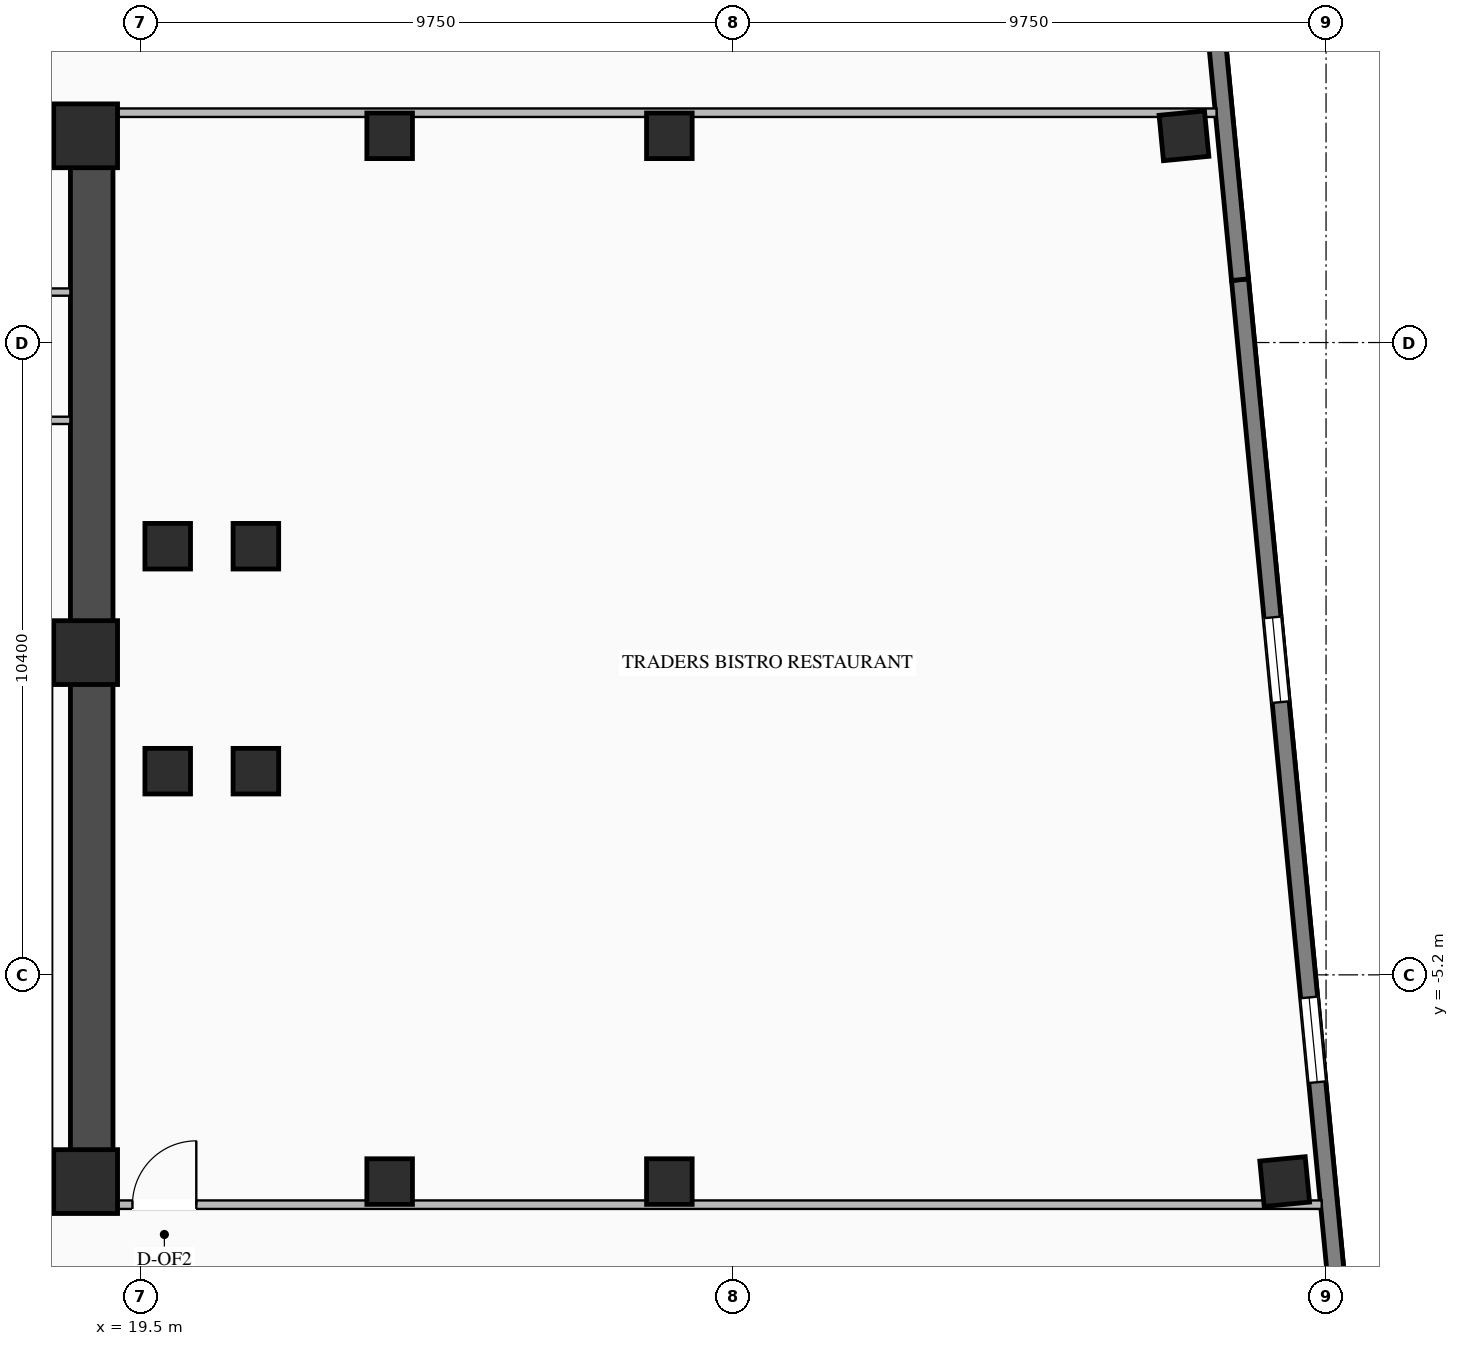
"""IFC4 building model, lengths in metres.
Left out: names, types, materials, properties, quantities, classifications, styles, units other than length and angle.
Written with IfcOpenShell. Run it as: python <this file> out.ifc"""

import sys

from ifc_helpers import new_model, si_unit, direction, frame, frame_2d, origin, origin_2d, place, context, subcontext, project, spatial, rectangle, i_section, extrude, element, fill, save


model = new_model("IFC4")
c1 = context("Model", 3, precision=1e-05, world=origin(), true_north=direction((0.0, 1.0)))
c2 = subcontext(c1, "Body", "Model", "MODEL_VIEW")
j1 = project(units=[si_unit("LENGTHUNIT", "METRE"), si_unit("PLANEANGLEUNIT", "RADIAN")], contexts=[c1])
p1 = place(None, origin())
s1 = spatial("IfcSite", under=j1, at=p1, CompositionType="ELEMENT")
p2 = place(p1, origin())
s2 = spatial("IfcBuilding", under=s1, at=p2, CompositionType="ELEMENT")
p3 = place(p2, frame((0.0, 0.0, 108.7)))
s3 = spatial("IfcBuildingStorey", under=s2, at=p3, CompositionType="ELEMENT", Elevation=108.7)
p4 = place(p3, frame((8.8, -8.7, 0.0), z_axis=(0.0, 0.0, 1.0), x_axis=(1.0, 0.0, 0.0)))
e1 = element("IfcWall", 1, at=p4, inside=s3, PredefinedType="SHEAR", context=c2, shape_type="SweptSolid", body=[
    extrude(rectangle(XDim=10.25, YDim=0.7, at=frame_2d((5.125, 0.0))), origin(), (0.0, 0.0, 1.0), 3.17),
])
p5 = place(p3, frame((8.8, 8.7, 0.0), z_axis=(0.0, 0.0, 1.0), x_axis=(1.0, 0.0, 0.0)))
e2 = element("IfcWall", 2, at=p5, inside=s3, PredefinedType="SHEAR", context=c2, shape_type="SweptSolid", body=[
    extrude(rectangle(XDim=10.25, YDim=0.7, at=frame_2d((5.125, 0.0))), origin(), (0.0, 0.0, 1.0), 3.17),
])
p6 = place(p5, frame((3.25, 0.0, 0.0)))
e3 = element("IfcOpeningElement", 3, at=p6, cuts=e2, PredefinedType="OPENING", context=c2, shape_type="SweptSolid", body=[
    extrude(rectangle(XDim=1.4, YDim=2.05, at=frame_2d((0.7, 1.025))), frame((0.0, 0.36, 0.0), z_axis=(0.0, -1.0, 0.0), x_axis=(1.0, 0.0, 0.0)), (0.0, 0.0, 1.0), 0.72),
])
p7 = place(p3, frame((18.7, -8.35, 0.0), z_axis=(0.0, 0.0, 1.0), x_axis=(0.0, 1.0, 0.0)))
e4 = element("IfcWall", 4, at=p7, inside=s3, PredefinedType="SHEAR", context=c2, shape_type="SweptSolid", body=[
    extrude(rectangle(XDim=16.7, YDim=0.7, at=frame_2d((8.35, 0.0))), origin(), (0.0, 0.0, 1.0), 3.17),
])
for number, where, z_axis, x_axis in (
    (5, (18.6, -8.6, 0.0), (0.0, 0.0, 1.0), (1.0, 0.0, 0.0)),
    (6, (18.6, 0.1, 0.0), (0.0, 0.0, 1.0), (1.0, 0.0, 0.0)),
    (7, (18.6, 8.6, 0.0), (0.0, 0.0, 1.0), (1.0, 0.0, 0.0)),
):
    element("IfcColumn", number, at=place(p3, frame(where, z_axis=z_axis, x_axis=x_axis)), inside=s3, PredefinedType="COLUMN", context=c2, shape_type="SweptSolid", body=[
        extrude(rectangle(XDim=1.05, YDim=1.05, at=origin_2d()), origin(), (0.0, 0.0, 1.0), 3.45),
    ])
for number, where, z_axis, x_axis in (
    (8, (19.95, -1.85, 0.0), (0.0, 0.0, 1.0), (1.0, 0.0, 0.0)),
    (9, (19.95, 1.85, 0.0), (0.0, 0.0, 1.0), (1.0, 0.0, 0.0)),
    (10, (21.4, -1.85, 0.0), (0.0, 0.0, 1.0), (1.0, 0.0, 0.0)),
    (11, (21.4, 1.85, 0.0), (0.0, 0.0, 1.0), (1.0, 0.0, 0.0)),
    (12, (23.6, -8.6, 0.0), (0.0, 0.0, 1.0), (1.0, 0.0, 0.0)),
    (13, (23.6, 8.6, 0.0), (0.0, 0.0, 1.0), (1.0, 0.0, 0.0)),
    (14, (28.2, -8.6, 0.0), (0.0, 0.0, 1.0), (1.0, 0.0, 0.0)),
    (15, (28.2, 8.6, 0.0), (0.0, 0.0, 1.0), (1.0, 0.0, 0.0)),
    (16, (38.32, -8.6, 0.0), (0.0, 0.0, 1.0), (0.995, 0.096, 0.0)),
    (17, (36.664, 8.6, 0.0), (0.0, 0.0, 1.0), (0.995, 0.096, 0.0)),
):
    element("IfcColumn", number, at=place(p3, frame(where, z_axis=z_axis, x_axis=x_axis)), inside=s3, PredefinedType="COLUMN", context=c2, shape_type="SweptSolid", body=[
        extrude(i_section(OverallWidth=0.75, OverallDepth=0.75, WebThickness=0.03, FlangeThickness=0.044, at=origin_2d()), origin(), (0.0, 0.0, 1.0), 3.45),
    ])
p8 = place(p3, frame((37.585, 6.234, 0.0), z_axis=(0.0, 0.0, 1.0), x_axis=(0.095841297881, -0.99539662729, 0.0)))
e18 = element("IfcWall", 18, at=p8, inside=s3, PredefinedType="STANDARD", context=c2, shape_type="SweptSolid", body=[
    extrude(rectangle(XDim=18.84, YDim=0.28, at=frame_2d((9.42, 0.0))), origin(), (0.0, 0.0, 1.0), 3.15),
])
p9 = place(p8, frame((5.58, 0.0, 0.76)))
e19 = element("IfcOpeningElement", 19, at=p9, cuts=e18, PredefinedType="OPENING", context=c2, shape_type="SweptSolid", body=[
    extrude(rectangle(XDim=1.4, YDim=1.95, at=frame_2d((0.7, 0.975))), frame((0.0, 0.15, 0.0), z_axis=(0.0, -1.0, 0.0), x_axis=(1.0, 0.0, 0.0)), (0.0, 0.0, 1.0), 0.3),
])
p10 = place(p8, frame((11.86, 0.0, 0.76)))
e20 = element("IfcOpeningElement", 20, at=p10, cuts=e18, PredefinedType="OPENING", context=c2, shape_type="SweptSolid", body=[
    extrude(rectangle(XDim=1.4, YDim=1.95, at=frame_2d((0.7, 0.975))), frame((0.0, 0.15, 0.0), z_axis=(0.0, -1.0, 0.0), x_axis=(1.0, 0.0, 0.0)), (0.0, 0.0, 1.0), 0.3),
])
p11 = place(p3, frame((35.779, 24.987, 0.0), z_axis=(0.0, 0.0, 1.0), x_axis=(0.095842534142, -0.995396508256, 0.0)))
e21 = element("IfcWall", 21, at=p11, inside=s3, PredefinedType="STANDARD", context=c2, shape_type="SweptSolid", body=[
    extrude(rectangle(XDim=18.84, YDim=0.28, at=frame_2d((9.42, 0.0))), origin(), (0.0, 0.0, 1.0), 3.15),
])
p12 = place(p11, frame((5.58, 0.0, 0.76)))
e22 = element("IfcOpeningElement", 22, at=p12, cuts=e21, PredefinedType="OPENING", context=c2, shape_type="SweptSolid", body=[
    extrude(rectangle(XDim=1.4, YDim=1.95, at=frame_2d((0.7, 0.975))), frame((0.0, 0.15, 0.0), z_axis=(0.0, -1.0, 0.0), x_axis=(1.0, 0.0, 0.0)), (0.0, 0.0, 1.0), 0.3),
])
p13 = place(p11, frame((11.86, 0.0, 0.76)))
e23 = element("IfcOpeningElement", 23, at=p13, cuts=e21, PredefinedType="OPENING", context=c2, shape_type="SweptSolid", body=[
    extrude(rectangle(XDim=1.4, YDim=1.95, at=frame_2d((0.7, 0.975))), frame((0.0, 0.15, 0.0), z_axis=(0.0, -1.0, 0.0), x_axis=(1.0, 0.0, 0.0)), (0.0, 0.0, 1.0), 0.3),
])
p14 = place(p3, frame((13.9, 3.92, 0.0), z_axis=(0.0, 0.0, 1.0), x_axis=(1.0, 0.0, 0.0)))
e24 = element("IfcWall", 24, at=p14, inside=s3, PredefinedType="STANDARD", context=c2, shape_type="SweptSolid", body=[
    extrude(rectangle(XDim=4.45, YDim=0.12, at=frame_2d((2.225, 0.0))), origin(), (0.0, 0.0, 1.0), 3.15),
])
p15 = place(p3, frame((16.15, 6.03, 0.0), z_axis=(0.0, 0.0, 1.0), x_axis=(1.0, 0.0, 0.0)))
e25 = element("IfcWall", 25, at=p15, inside=s3, PredefinedType="STANDARD", context=c2, shape_type="SweptSolid", body=[
    extrude(rectangle(XDim=2.2, YDim=0.12, at=frame_2d((1.1, 0.0))), origin(), (0.0, 0.0, 1.0), 3.15),
])
p16 = place(p3, frame((19.05, 8.98, 0.0), z_axis=(0.0, 0.0, 1.0), x_axis=(1.0, 0.0, 0.0)))
e26 = element("IfcWall", 26, at=p16, inside=s3, PredefinedType="STANDARD", context=c2, shape_type="SweptSolid", body=[
    extrude(rectangle(XDim=18.15, YDim=0.14, at=frame_2d((9.075, 0.0))), origin(), (0.0, 0.0, 1.0), 3.15),
])
p17 = place(p3, frame((19.05, -8.98, 0.0), z_axis=(0.0, 0.0, 1.0), x_axis=(1.0, 0.0, 0.0)))
e27 = element("IfcWall", 27, at=p17, inside=s3, PredefinedType="STANDARD", context=c2, shape_type="SweptSolid", body=[
    extrude(rectangle(XDim=19.879, YDim=0.14, at=frame_2d((9.939, 0.0))), origin(), (0.0, 0.0, 1.0), 3.15),
])
p18 = place(p17, frame((0.32, 0.0, 0.0)))
e28 = element("IfcOpeningElement", 28, at=p18, cuts=e27, PredefinedType="OPENING", context=c2, shape_type="SweptSolid", body=[
    extrude(rectangle(XDim=1.05, YDim=2.08, at=frame_2d((0.525, 1.04))), frame((0.0, 0.08, 0.0), z_axis=(0.0, -1.0, 0.0), x_axis=(1.0, 0.0, 0.0)), (0.0, 0.0, 1.0), 0.16),
])
p19 = place(p9, origin())
e29 = element("IfcWindow", 29, at=p19, inside=s3, PartitioningType="SINGLE_PANEL", PredefinedType="WINDOW", context=c2, shape_type="SweptSolid", body=[
    extrude(rectangle(XDim=1.4, YDim=1.95, at=frame_2d((0.7, 0.975))), frame((0.0, 0.03, 0.0), z_axis=(0.0, -1.0, 0.0), x_axis=(1.0, 0.0, 0.0)), (0.0, 0.0, 1.0), 0.06),
])
fill(e19, e29)
p20 = place(p10, origin())
e30 = element("IfcWindow", 30, at=p20, inside=s3, PartitioningType="SINGLE_PANEL", PredefinedType="WINDOW", context=c2, shape_type="SweptSolid", body=[
    extrude(rectangle(XDim=1.4, YDim=1.95, at=frame_2d((0.7, 0.975))), frame((0.0, 0.03, 0.0), z_axis=(0.0, -1.0, 0.0), x_axis=(1.0, 0.0, 0.0)), (0.0, 0.0, 1.0), 0.06),
])
fill(e20, e30)
p21 = place(p18, origin())
e31 = element("IfcDoor", 31, at=p21, inside=s3, OperationType="SINGLE_SWING_RIGHT", PredefinedType="DOOR", context=c2, shape_type="SweptSolid", body=[
    extrude(rectangle(XDim=1.05, YDim=2.08, at=frame_2d((0.525, 1.04))), frame((0.0, 0.025, 0.0), z_axis=(0.0, -1.0, 0.0), x_axis=(1.0, 0.0, 0.0)), (0.0, 0.0, 1.0), 0.05),
])
fill(e28, e31)
save(model, sys.argv[1])
